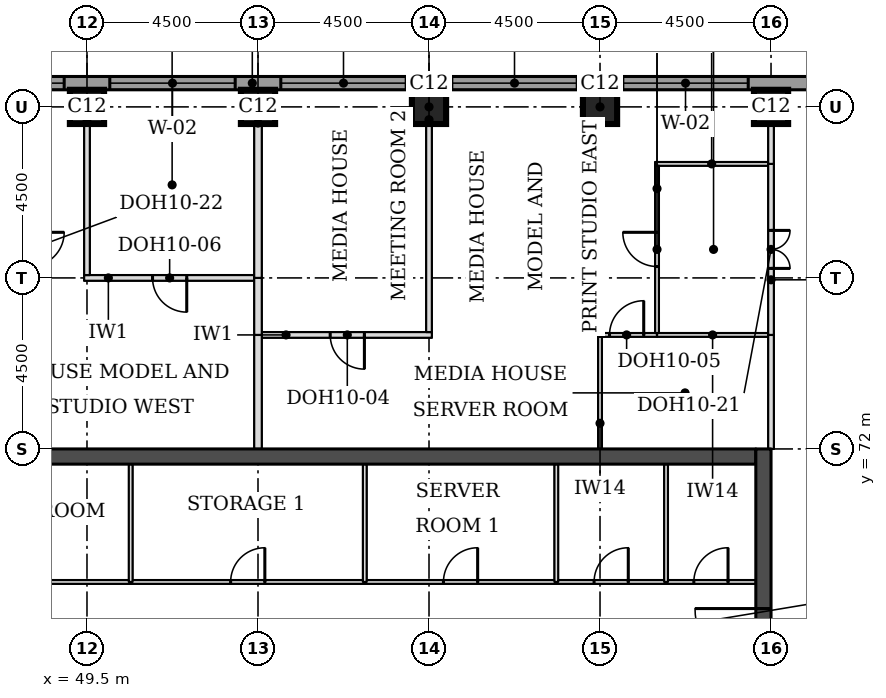
"""IFC4 building model, lengths in metres.
Left out: names, types, materials, properties, quantities, classifications, styles, units other than length and angle.
Written with IfcOpenShell. Run it as: python <this file> out.ifc"""

import sys

from ifc_helpers import new_model, si_unit, direction, frame, frame_2d, origin, origin_2d, place, context, subcontext, project, spatial, rectangle, extrude, element, fill, save


model = new_model("IFC4")
c1 = context("Model", 3, precision=1e-05, world=origin(), true_north=direction((0.0, 1.0)))
c2 = subcontext(c1, "Body", "Model", "MODEL_VIEW")
j1 = project(units=[si_unit("LENGTHUNIT", "METRE"), si_unit("PLANEANGLEUNIT", "RADIAN")], contexts=[c1])
p1 = place(None, origin())
s1 = spatial("IfcSite", under=j1, at=p1, CompositionType="ELEMENT")
p2 = place(p1, origin())
s2 = spatial("IfcBuilding", under=s1, at=p2, CompositionType="ELEMENT")
p3 = place(p2, frame((0.0, 0.0, 223.0)))
s3 = spatial("IfcBuildingStorey", under=s2, at=p3, CompositionType="ELEMENT", Elevation=223.0)
for number, where, z_axis, x_axis in (
    (1, (49.5, 81.0, 0.0), (0.0, 0.0, 1.0), (1.0, 0.0, 0.0)),
    (2, (54.0, 81.0, 0.0), (0.0, 0.0, 1.0), (1.0, 0.0, 0.0)),
    (3, (58.5, 81.0, 0.0), (0.0, 0.0, 1.0), (1.0, 0.0, 0.0)),
    (4, (63.0, 81.0, 0.0), (0.0, 0.0, 1.0), (1.0, 0.0, 0.0)),
    (5, (67.5, 81.0, 0.0), (0.0, 0.0, 1.0), (1.0, 0.0, 0.0)),
):
    element("IfcColumn", number, at=place(p3, frame(where, z_axis=z_axis, x_axis=x_axis)), inside=s3, PredefinedType="COLUMN", context=c2, shape_type="SweptSolid", body=[
        extrude(rectangle(XDim=0.9, YDim=0.9, at=origin_2d()), origin(), (0.0, 0.0, 1.0), 3.7),
    ])
p4 = place(p3, frame((45.4, 71.8, 0.0), z_axis=(0.0, 0.0, 1.0), x_axis=(1.0, 0.0, 0.0)))
e6 = element("IfcWall", 6, at=p4, inside=s3, PredefinedType="SHEAR", context=c2, shape_type="SweptSolid", body=[
    extrude(rectangle(XDim=21.7, YDim=0.4, at=frame_2d((10.85, 0.0))), origin(), (0.0, 0.0, 1.0), 3.7),
])
p5 = place(p3, frame((67.3, 49.5, 0.0), z_axis=(0.0, 0.0, 1.0), x_axis=(0.0, 1.0, 0.0)))
e7 = element("IfcWall", 7, at=p5, inside=s3, PredefinedType="SHEAR", context=c2, shape_type="SweptSolid", body=[
    extrude(rectangle(XDim=22.5, YDim=0.4, at=frame_2d((11.25, 0.0))), origin(), (0.0, 0.0, 1.0), 3.7),
])
p6 = place(p5, frame((4.2, 0.0, 0.0)))
e8 = element("IfcOpeningElement", 8, at=p6, cuts=e7, PredefinedType="OPENING", context=c2, shape_type="SweptSolid", body=[
    extrude(rectangle(XDim=1.8, YDim=2.1, at=frame_2d((0.9, 1.05))), frame((0.0, 0.21, 0.0), z_axis=(0.0, -1.0, 0.0), x_axis=(1.0, 0.0, 0.0)), (0.0, 0.0, 1.0), 0.42),
])
p7 = place(p5, frame((6.9, 0.0, 0.0)))
e9 = element("IfcOpeningElement", 9, at=p7, cuts=e7, PredefinedType="OPENING", context=c2, shape_type="SweptSolid", body=[
    extrude(rectangle(XDim=1.1, YDim=2.1, at=frame_2d((0.55, 1.05))), frame((0.0, 0.21, 0.0), z_axis=(0.0, -1.0, 0.0), x_axis=(1.0, 0.0, 0.0)), (0.0, 0.0, 1.0), 0.42),
])
p8 = place(p5, frame((13.6, 0.0, 0.0)))
e10 = element("IfcOpeningElement", 10, at=p8, cuts=e7, PredefinedType="OPENING", context=c2, shape_type="SweptSolid", body=[
    extrude(rectangle(XDim=1.1, YDim=2.1, at=frame_2d((0.55, 1.05))), frame((0.0, 0.21, 0.0), z_axis=(0.0, -1.0, 0.0), x_axis=(1.0, 0.0, 0.0)), (0.0, 0.0, 1.0), 0.42),
])
p9 = place(p5, frame((16.5, 0.0, 0.0)))
e11 = element("IfcOpeningElement", 11, at=p9, cuts=e7, PredefinedType="OPENING", context=c2, shape_type="SweptSolid", body=[
    extrude(rectangle(XDim=1.8, YDim=2.1, at=frame_2d((0.9, 1.05))), frame((0.0, 0.21, 0.0), z_axis=(0.0, -1.0, 0.0), x_axis=(1.0, 0.0, 0.0)), (0.0, 0.0, 1.0), 0.42),
])
p10 = place(p3, frame((72.331, 81.625, 0.0), z_axis=(0.0, 0.0, 1.0), x_axis=(-1.0, 0.0, 0.0)))
e12 = element("IfcWall", 12, at=p10, inside=s3, PredefinedType="STANDARD", context=c2, shape_type="SweptSolid", body=[
    extrude(rectangle(XDim=32.163, YDim=0.35, at=frame_2d((16.081, 0.0))), origin(), (0.0, 0.0, 1.0), 3.525),
])
p11 = place(p10, frame((5.431, 0.0, 0.9)))
e13 = element("IfcOpeningElement", 13, at=p11, cuts=e12, PredefinedType="OPENING", context=c2, shape_type="SweptSolid", body=[
    extrude(rectangle(XDim=3.3, YDim=1.9, at=frame_2d((1.65, 0.95))), frame((0.0, 0.185, 0.0), z_axis=(0.0, -1.0, 0.0), x_axis=(1.0, 0.0, 0.0)), (0.0, 0.0, 1.0), 0.37),
])
p12 = place(p10, frame((9.931, 0.0, 0.9)))
e14 = element("IfcOpeningElement", 14, at=p12, cuts=e12, PredefinedType="OPENING", context=c2, shape_type="SweptSolid", body=[
    extrude(rectangle(XDim=3.3, YDim=1.9, at=frame_2d((1.65, 0.95))), frame((0.0, 0.185, 0.0), z_axis=(0.0, -1.0, 0.0), x_axis=(1.0, 0.0, 0.0)), (0.0, 0.0, 1.0), 0.37),
])
p13 = place(p10, frame((14.431, 0.0, 0.9)))
e15 = element("IfcOpeningElement", 15, at=p13, cuts=e12, PredefinedType="OPENING", context=c2, shape_type="SweptSolid", body=[
    extrude(rectangle(XDim=3.3, YDim=1.9, at=frame_2d((1.65, 0.95))), frame((0.0, 0.185, 0.0), z_axis=(0.0, -1.0, 0.0), x_axis=(1.0, 0.0, 0.0)), (0.0, 0.0, 1.0), 0.37),
])
p14 = place(p10, frame((18.931, 0.0, 0.9)))
e16 = element("IfcOpeningElement", 16, at=p14, cuts=e12, PredefinedType="OPENING", context=c2, shape_type="SweptSolid", body=[
    extrude(rectangle(XDim=3.3, YDim=1.9, at=frame_2d((1.65, 0.95))), frame((0.0, 0.185, 0.0), z_axis=(0.0, -1.0, 0.0), x_axis=(1.0, 0.0, 0.0)), (0.0, 0.0, 1.0), 0.37),
])
p15 = place(p10, frame((23.431, 0.0, 0.9)))
e17 = element("IfcOpeningElement", 17, at=p15, cuts=e12, PredefinedType="OPENING", context=c2, shape_type="SweptSolid", body=[
    extrude(rectangle(XDim=3.3, YDim=1.9, at=frame_2d((1.65, 0.95))), frame((0.0, 0.185, 0.0), z_axis=(0.0, -1.0, 0.0), x_axis=(1.0, 0.0, 0.0)), (0.0, 0.0, 1.0), 0.37),
])
p16 = place(p3, frame((54.1, 75.0, 0.0), z_axis=(0.0, 0.0, 1.0), x_axis=(1.0, 0.0, 0.0)))
e18 = element("IfcWall", 18, at=p16, inside=s3, PredefinedType="PARTITIONING", context=c2, shape_type="SweptSolid", body=[
    extrude(rectangle(XDim=4.475, YDim=0.15, at=frame_2d((2.237, 0.0))), origin(), (0.0, 0.0, 1.0), 3.55),
])
p17 = place(p16, frame((1.8, 0.0, 0.0)))
e19 = element("IfcOpeningElement", 19, at=p17, cuts=e18, PredefinedType="OPENING", context=c2, shape_type="SweptSolid", body=[
    extrude(rectangle(XDim=0.9, YDim=2.1, at=frame_2d((0.45, 1.05))), frame((0.0, 0.085, 0.0), z_axis=(0.0, -1.0, 0.0), x_axis=(1.0, 0.0, 0.0)), (0.0, 0.0, 1.0), 0.17),
])
p18 = place(p3, frame((62.95, 75.0, 0.0), z_axis=(0.0, 0.0, 1.0), x_axis=(1.0, 0.0, 0.0)))
e20 = element("IfcWall", 20, at=p18, inside=s3, PredefinedType="PARTITIONING", context=c2, shape_type="SweptSolid", body=[
    extrude(rectangle(XDim=1.55, YDim=0.1, at=frame_2d((0.775, 0.0))), origin(), (0.0, 0.0, 1.0), 3.55),
])
p19 = place(p18, frame((0.3, 0.0, 0.0)))
e21 = element("IfcOpeningElement", 21, at=p19, cuts=e20, PredefinedType="OPENING", context=c2, shape_type="SweptSolid", body=[
    extrude(rectangle(XDim=0.9, YDim=2.1, at=frame_2d((0.45, 1.05))), frame((0.0, 0.06, 0.0), z_axis=(0.0, -1.0, 0.0), x_axis=(1.0, 0.0, 0.0)), (0.0, 0.0, 1.0), 0.12),
])
p20 = place(p3, frame((64.5, 75.0, 0.0), z_axis=(0.0, 0.0, 1.0), x_axis=(1.0, 0.0, 0.0)))
e22 = element("IfcWall", 22, at=p20, inside=s3, PredefinedType="PARTITIONING", context=c2, shape_type="SweptSolid", body=[
    extrude(rectangle(XDim=2.925, YDim=0.1, at=frame_2d((1.462, 0.0))), origin(), (0.0, 0.0, 1.0), 3.55),
])
p21 = place(p3, frame((49.425, 76.5, 0.0), z_axis=(0.0, 0.0, 1.0), x_axis=(1.0, 0.0, 0.0)))
e23 = element("IfcWall", 23, at=p21, inside=s3, PredefinedType="PARTITIONING", context=c2, shape_type="SweptSolid", body=[
    extrude(rectangle(XDim=4.475, YDim=0.15, at=frame_2d((2.237, 0.0))), origin(), (0.0, 0.0, 1.0), 3.55),
])
p22 = place(p21, frame((1.8, 0.0, 0.0)))
e24 = element("IfcOpeningElement", 24, at=p22, cuts=e23, PredefinedType="OPENING", context=c2, shape_type="SweptSolid", body=[
    extrude(rectangle(XDim=0.9, YDim=2.1, at=frame_2d((0.45, 1.05))), frame((0.0, 0.085, 0.0), z_axis=(0.0, -1.0, 0.0), x_axis=(1.0, 0.0, 0.0)), (0.0, 0.0, 1.0), 0.17),
])
p23 = place(p3, frame((64.45, 79.5, 0.0), z_axis=(0.0, 0.0, 1.0), x_axis=(1.0, 0.0, 0.0)))
e25 = element("IfcWall", 25, at=p23, inside=s3, PredefinedType="PARTITIONING", context=c2, shape_type="SweptSolid", body=[
    extrude(rectangle(XDim=2.975, YDim=0.1, at=frame_2d((1.488, 0.0))), origin(), (0.0, 0.0, 1.0), 3.55),
])
p24 = place(p3, frame((54.0, 72.0, 0.0), z_axis=(0.0, 0.0, 1.0), x_axis=(0.0, 1.0, 0.0)))
e26 = element("IfcWall", 26, at=p24, inside=s3, PredefinedType="PARTITIONING", context=c2, shape_type="SweptSolid", body=[
    extrude(rectangle(XDim=3.0, YDim=0.2, at=frame_2d((1.5, 0.0))), origin(), (0.0, 0.0, 1.0), 3.55),
])
p25 = place(p3, frame((63.0, 72.0, 0.0), z_axis=(0.0, 0.0, 1.0), x_axis=(0.0, 1.0, 0.0)))
e27 = element("IfcWall", 27, at=p25, inside=s3, PredefinedType="PARTITIONING", context=c2, shape_type="SweptSolid", body=[
    extrude(rectangle(XDim=2.95, YDim=0.1, at=frame_2d((1.475, 0.0))), origin(), (0.0, 0.0, 1.0), 3.55),
])
p26 = place(p3, frame((67.5, 72.0, 0.0), z_axis=(0.0, 0.0, 1.0), x_axis=(0.0, 1.0, 0.0)))
e28 = element("IfcWall", 28, at=p26, inside=s3, PredefinedType="PARTITIONING", context=c2, shape_type="SweptSolid", body=[
    extrude(rectangle(XDim=3.0, YDim=0.15, at=frame_2d((1.5, 0.0))), origin(), (0.0, 0.0, 1.0), 3.022),
])
p27 = place(p3, frame((54.0, 75.0, 0.0), z_axis=(0.0, 0.0, 1.0), x_axis=(0.0, 1.0, 0.0)))
e29 = element("IfcWall", 29, at=p27, inside=s3, PredefinedType="PARTITIONING", context=c2, shape_type="SweptSolid", body=[
    extrude(rectangle(XDim=1.5, YDim=0.2, at=frame_2d((0.75, 0.0))), origin(), (0.0, 0.0, 1.0), 3.55),
])
p28 = place(p3, frame((67.5, 75.0, 0.0), z_axis=(0.0, 0.0, 1.0), x_axis=(0.0, 1.0, 0.0)))
e30 = element("IfcWall", 30, at=p28, inside=s3, PredefinedType="PARTITIONING", context=c2, shape_type="SweptSolid", body=[
    extrude(rectangle(XDim=4.5, YDim=0.15, at=frame_2d((2.25, 0.0))), origin(), (0.0, 0.0, 1.0), 3.022),
])
p29 = place(p28, frame((1.75, 0.0, 0.0)))
e31 = element("IfcOpeningElement", 31, at=p29, cuts=e30, PredefinedType="OPENING", context=c2, shape_type="SweptSolid", body=[
    extrude(rectangle(XDim=1.0, YDim=2.1, at=frame_2d((0.5, 1.05))), frame((0.0, 0.085, 0.0), z_axis=(0.0, -1.0, 0.0), x_axis=(1.0, 0.0, 0.0)), (0.0, 0.0, 1.0), 0.17),
])
p30 = place(p3, frame((64.5, 75.05, 0.0), z_axis=(0.0, 0.0, 1.0), x_axis=(0.0, 1.0, 0.0)))
e32 = element("IfcWall", 32, at=p30, inside=s3, PredefinedType="PARTITIONING", context=c2, shape_type="SweptSolid", body=[
    extrude(rectangle(XDim=4.4, YDim=0.1, at=frame_2d((2.2, 0.0))), origin(), (0.0, 0.0, 1.0), 3.55),
])
p31 = place(p30, frame((1.75, 0.0, 0.0)))
e33 = element("IfcOpeningElement", 33, at=p31, cuts=e32, PredefinedType="OPENING", context=c2, shape_type="SweptSolid", body=[
    extrude(rectangle(XDim=0.9, YDim=2.1, at=frame_2d((0.45, 1.05))), frame((0.0, 0.06, 0.0), z_axis=(0.0, -1.0, 0.0), x_axis=(1.0, 0.0, 0.0)), (0.0, 0.0, 1.0), 0.12),
])
p32 = place(p3, frame((58.5, 75.075, 0.0), z_axis=(0.0, 0.0, 1.0), x_axis=(0.0, 1.0, 0.0)))
e34 = element("IfcWall", 34, at=p32, inside=s3, PredefinedType="PARTITIONING", context=c2, shape_type="SweptSolid", body=[
    extrude(rectangle(XDim=6.375, YDim=0.15, at=frame_2d((3.188, 0.0))), origin(), (0.0, 0.0, 1.0), 3.55),
])
p33 = place(p3, frame((54.0, 76.5, 0.0), z_axis=(0.0, 0.0, 1.0), x_axis=(0.0, 1.0, 0.0)))
e35 = element("IfcWall", 35, at=p33, inside=s3, PredefinedType="PARTITIONING", context=c2, shape_type="SweptSolid", body=[
    extrude(rectangle(XDim=4.95, YDim=0.2, at=frame_2d((2.475, 0.0))), origin(), (0.0, 0.0, 1.0), 3.55),
])
p34 = place(p3, frame((49.5, 76.575, 0.0), z_axis=(0.0, 0.0, 1.0), x_axis=(0.0, 1.0, 0.0)))
e36 = element("IfcWall", 36, at=p34, inside=s3, PredefinedType="PARTITIONING", context=c2, shape_type="SweptSolid", body=[
    extrude(rectangle(XDim=4.875, YDim=0.15, at=frame_2d((2.438, 0.0))), origin(), (0.0, 0.0, 1.0), 3.55),
])
p35 = place(p3, frame((67.5, 79.5, 0.0), z_axis=(0.0, 0.0, 1.0), x_axis=(0.0, 1.0, 0.0)))
e37 = element("IfcWall", 37, at=p35, inside=s3, PredefinedType="PARTITIONING", context=c2, shape_type="SweptSolid", body=[
    extrude(rectangle(XDim=1.95, YDim=0.15, at=frame_2d((0.975, 0.0))), origin(), (0.0, 0.0, 1.0), 3.022),
])
p36 = place(p3, frame((45.4, 68.5, 0.0), z_axis=(0.0, 0.0, 1.0), x_axis=(1.0, 0.0, 0.0)))
e38 = element("IfcWall", 38, at=p36, inside=s3, PredefinedType="PARTITIONING", context=c2, shape_type="SweptSolid", body=[
    extrude(rectangle(XDim=21.7, YDim=0.1, at=frame_2d((10.85, 0.0))), origin(), (0.0, 0.0, 1.0), 3.55),
])
p37 = place(p36, frame((20.069, 0.0, 0.0)))
e39 = element("IfcOpeningElement", 39, at=p37, cuts=e38, PredefinedType="OPENING", context=c2, shape_type="SweptSolid", body=[
    extrude(rectangle(XDim=0.9, YDim=2.1, at=frame_2d((0.45, 1.05))), frame((0.0, 0.06, 0.0), z_axis=(0.0, -1.0, 0.0), x_axis=(1.0, 0.0, 0.0)), (0.0, 0.0, 1.0), 0.12),
])
p38 = place(p36, frame((17.444, 0.0, 0.0)))
e40 = element("IfcOpeningElement", 40, at=p38, cuts=e38, PredefinedType="OPENING", context=c2, shape_type="SweptSolid", body=[
    extrude(rectangle(XDim=0.9, YDim=2.1, at=frame_2d((0.45, 1.05))), frame((0.0, 0.06, 0.0), z_axis=(0.0, -1.0, 0.0), x_axis=(1.0, 0.0, 0.0)), (0.0, 0.0, 1.0), 0.12),
])
p39 = place(p36, frame((2.175, 0.0, 0.0)))
e41 = element("IfcOpeningElement", 41, at=p39, cuts=e38, PredefinedType="OPENING", context=c2, shape_type="SweptSolid", body=[
    extrude(rectangle(XDim=0.9, YDim=2.1, at=frame_2d((0.45, 1.05))), frame((0.0, 0.06, 0.0), z_axis=(0.0, -1.0, 0.0), x_axis=(1.0, 0.0, 0.0)), (0.0, 0.0, 1.0), 0.12),
])
p40 = place(p36, frame((13.48, 0.0, 0.0)))
e42 = element("IfcOpeningElement", 42, at=p40, cuts=e38, PredefinedType="OPENING", context=c2, shape_type="SweptSolid", body=[
    extrude(rectangle(XDim=0.9, YDim=2.1, at=frame_2d((0.45, 1.05))), frame((0.0, 0.06, 0.0), z_axis=(0.0, -1.0, 0.0), x_axis=(1.0, 0.0, 0.0)), (0.0, 0.0, 1.0), 0.12),
])
p41 = place(p36, frame((7.88, 0.0, 0.0)))
e43 = element("IfcOpeningElement", 43, at=p41, cuts=e38, PredefinedType="OPENING", context=c2, shape_type="SweptSolid", body=[
    extrude(rectangle(XDim=0.9, YDim=2.1, at=frame_2d((0.45, 1.05))), frame((0.0, 0.06, 0.0), z_axis=(0.0, -1.0, 0.0), x_axis=(1.0, 0.0, 0.0)), (0.0, 0.0, 1.0), 0.12),
])
for number, where, z_axis, x_axis in (
    (44, (50.65, 68.5, 0.0), (0.0, 0.0, 1.0), (0.0, 1.0, 0.0)),
    (45, (56.81, 68.5, 0.0), (0.0, 0.0, 1.0), (0.0, 1.0, 0.0)),
    (46, (61.85, 68.5, 0.0), (0.0, 0.0, 1.0), (0.0, 1.0, 0.0)),
    (47, (64.738, 68.5, 0.0), (0.0, 0.0, 1.0), (0.0, 1.0, 0.0)),
):
    element("IfcWall", number, at=place(p3, frame(where, z_axis=z_axis, x_axis=x_axis)), inside=s3, PredefinedType="PARTITIONING", context=c2, shape_type="SweptSolid", body=[
        extrude(rectangle(XDim=3.1, YDim=0.1, at=frame_2d((1.55, 0.0))), origin(), (0.0, 0.0, 1.0), 3.55),
    ])
p42 = place(p11, origin())
e48 = element("IfcWindow", 48, at=p42, inside=s3, PartitioningType="SINGLE_PANEL", PredefinedType="WINDOW", context=c2, shape_type="SweptSolid", body=[
    extrude(rectangle(XDim=3.3, YDim=1.9, at=frame_2d((1.65, 0.95))), frame((0.0, 0.085, 0.0), z_axis=(0.0, -1.0, 0.0), x_axis=(1.0, 0.0, 0.0)), (0.0, 0.0, 1.0), 0.06),
])
fill(e13, e48)
p43 = place(p12, origin())
e49 = element("IfcWindow", 49, at=p43, inside=s3, PartitioningType="SINGLE_PANEL", PredefinedType="WINDOW", context=c2, shape_type="SweptSolid", body=[
    extrude(rectangle(XDim=3.3, YDim=1.9, at=frame_2d((1.65, 0.95))), frame((0.0, 0.085, 0.0), z_axis=(0.0, -1.0, 0.0), x_axis=(1.0, 0.0, 0.0)), (0.0, 0.0, 1.0), 0.06),
])
fill(e14, e49)
p44 = place(p13, origin())
e50 = element("IfcWindow", 50, at=p44, inside=s3, PartitioningType="SINGLE_PANEL", PredefinedType="WINDOW", context=c2, shape_type="SweptSolid", body=[
    extrude(rectangle(XDim=3.3, YDim=1.9, at=frame_2d((1.65, 0.95))), frame((0.0, 0.085, 0.0), z_axis=(0.0, -1.0, 0.0), x_axis=(1.0, 0.0, 0.0)), (0.0, 0.0, 1.0), 0.06),
])
fill(e15, e50)
p45 = place(p14, origin())
e51 = element("IfcWindow", 51, at=p45, inside=s3, PartitioningType="SINGLE_PANEL", PredefinedType="WINDOW", context=c2, shape_type="SweptSolid", body=[
    extrude(rectangle(XDim=3.3, YDim=1.9, at=frame_2d((1.65, 0.95))), frame((0.0, 0.085, 0.0), z_axis=(0.0, -1.0, 0.0), x_axis=(1.0, 0.0, 0.0)), (0.0, 0.0, 1.0), 0.06),
])
fill(e16, e51)
p46 = place(p15, origin())
e52 = element("IfcWindow", 52, at=p46, inside=s3, PartitioningType="SINGLE_PANEL", PredefinedType="WINDOW", context=c2, shape_type="SweptSolid", body=[
    extrude(rectangle(XDim=3.3, YDim=1.9, at=frame_2d((1.65, 0.95))), frame((0.0, 0.085, 0.0), z_axis=(0.0, -1.0, 0.0), x_axis=(1.0, 0.0, 0.0)), (0.0, 0.0, 1.0), 0.06),
])
fill(e17, e52)
p47 = place(p22, frame((0.9, 0.0, 0.0), z_axis=(0.0, 0.0, 1.0), x_axis=(-1.0, 0.0, 0.0)))
e53 = element("IfcDoor", 53, at=p47, inside=s3, OperationType="SINGLE_SWING_LEFT", PredefinedType="DOOR", context=c2, shape_type="SweptSolid", body=[
    extrude(rectangle(XDim=0.9, YDim=2.1, at=frame_2d((0.45, 1.05))), frame((0.0, 0.025, 0.0), z_axis=(0.0, -1.0, 0.0), x_axis=(1.0, 0.0, 0.0)), (0.0, 0.0, 1.0), 0.05),
])
fill(e24, e53)
p48 = place(p29, frame((1.0, 0.0, 0.0), z_axis=(0.0, 0.0, 1.0), x_axis=(-1.0, 0.0, 0.0)))
e54 = element("IfcDoor", 54, at=p48, inside=s3, OperationType="DOUBLE_DOOR_SINGLE_SWING", PredefinedType="DOOR", context=c2, shape_type="SweptSolid", body=[
    extrude(rectangle(XDim=1.0, YDim=2.1, at=frame_2d((0.5, 1.05))), frame((0.0, 0.025, 0.0), z_axis=(0.0, -1.0, 0.0), x_axis=(1.0, 0.0, 0.0)), (0.0, 0.0, 1.0), 0.05),
])
fill(e31, e54)
p49 = place(p31, origin())
e55 = element("IfcDoor", 55, at=p49, inside=s3, OperationType="SINGLE_SWING_RIGHT", PredefinedType="DOOR", context=c2, shape_type="SweptSolid", body=[
    extrude(rectangle(XDim=0.9, YDim=2.1, at=frame_2d((0.45, 1.05))), frame((0.0, 0.025, 0.0), z_axis=(0.0, -1.0, 0.0), x_axis=(1.0, 0.0, 0.0)), (0.0, 0.0, 1.0), 0.05),
])
fill(e33, e55)
p50 = place(p17, frame((0.9, 0.0, 0.0), z_axis=(0.0, 0.0, 1.0), x_axis=(-1.0, 0.0, 0.0)))
e56 = element("IfcDoor", 56, at=p50, inside=s3, OperationType="SINGLE_SWING_LEFT", PredefinedType="DOOR", context=c2, shape_type="SweptSolid", body=[
    extrude(rectangle(XDim=0.9, YDim=2.1, at=frame_2d((0.45, 1.05))), frame((0.0, 0.025, 0.0), z_axis=(0.0, -1.0, 0.0), x_axis=(1.0, 0.0, 0.0)), (0.0, 0.0, 1.0), 0.05),
])
fill(e19, e56)
p51 = place(p19, origin())
e57 = element("IfcDoor", 57, at=p51, inside=s3, OperationType="SINGLE_SWING_RIGHT", PredefinedType="DOOR", context=c2, shape_type="SweptSolid", body=[
    extrude(rectangle(XDim=0.9, YDim=2.1, at=frame_2d((0.45, 1.05))), frame((0.0, 0.025, 0.0), z_axis=(0.0, -1.0, 0.0), x_axis=(1.0, 0.0, 0.0)), (0.0, 0.0, 1.0), 0.05),
])
fill(e21, e57)
p52 = place(p9, origin())
e58 = element("IfcDoor", 58, at=p52, inside=s3, OperationType="SINGLE_SWING_RIGHT", PredefinedType="DOOR", context=c2, shape_type="SweptSolid", body=[
    extrude(rectangle(XDim=1.8, YDim=2.1, at=frame_2d((0.9, 1.05))), frame((0.0, 0.025, 0.0), z_axis=(0.0, -1.0, 0.0), x_axis=(1.0, 0.0, 0.0)), (0.0, 0.0, 1.0), 0.05),
])
fill(e11, e58)
p53 = place(p37, origin())
e59 = element("IfcDoor", 59, at=p53, inside=s3, OperationType="SINGLE_SWING_RIGHT", PredefinedType="DOOR", context=c2, shape_type="SweptSolid", body=[
    extrude(rectangle(XDim=0.9, YDim=2.1, at=frame_2d((0.45, 1.05))), frame((0.0, 0.025, 0.0), z_axis=(0.0, -1.0, 0.0), x_axis=(1.0, 0.0, 0.0)), (0.0, 0.0, 1.0), 0.05),
])
fill(e39, e59)
p54 = place(p38, origin())
e60 = element("IfcDoor", 60, at=p54, inside=s3, OperationType="SINGLE_SWING_RIGHT", PredefinedType="DOOR", context=c2, shape_type="SweptSolid", body=[
    extrude(rectangle(XDim=0.9, YDim=2.1, at=frame_2d((0.45, 1.05))), frame((0.0, 0.025, 0.0), z_axis=(0.0, -1.0, 0.0), x_axis=(1.0, 0.0, 0.0)), (0.0, 0.0, 1.0), 0.05),
])
fill(e40, e60)
p55 = place(p40, origin())
e61 = element("IfcDoor", 61, at=p55, inside=s3, OperationType="SINGLE_SWING_RIGHT", PredefinedType="DOOR", context=c2, shape_type="SweptSolid", body=[
    extrude(rectangle(XDim=0.9, YDim=2.1, at=frame_2d((0.45, 1.05))), frame((0.0, 0.025, 0.0), z_axis=(0.0, -1.0, 0.0), x_axis=(1.0, 0.0, 0.0)), (0.0, 0.0, 1.0), 0.05),
])
fill(e42, e61)
p56 = place(p41, origin())
e62 = element("IfcDoor", 62, at=p56, inside=s3, OperationType="SINGLE_SWING_RIGHT", PredefinedType="DOOR", context=c2, shape_type="SweptSolid", body=[
    extrude(rectangle(XDim=0.9, YDim=2.1, at=frame_2d((0.45, 1.05))), frame((0.0, 0.025, 0.0), z_axis=(0.0, -1.0, 0.0), x_axis=(1.0, 0.0, 0.0)), (0.0, 0.0, 1.0), 0.05),
])
fill(e43, e62)
save(model, sys.argv[1])
